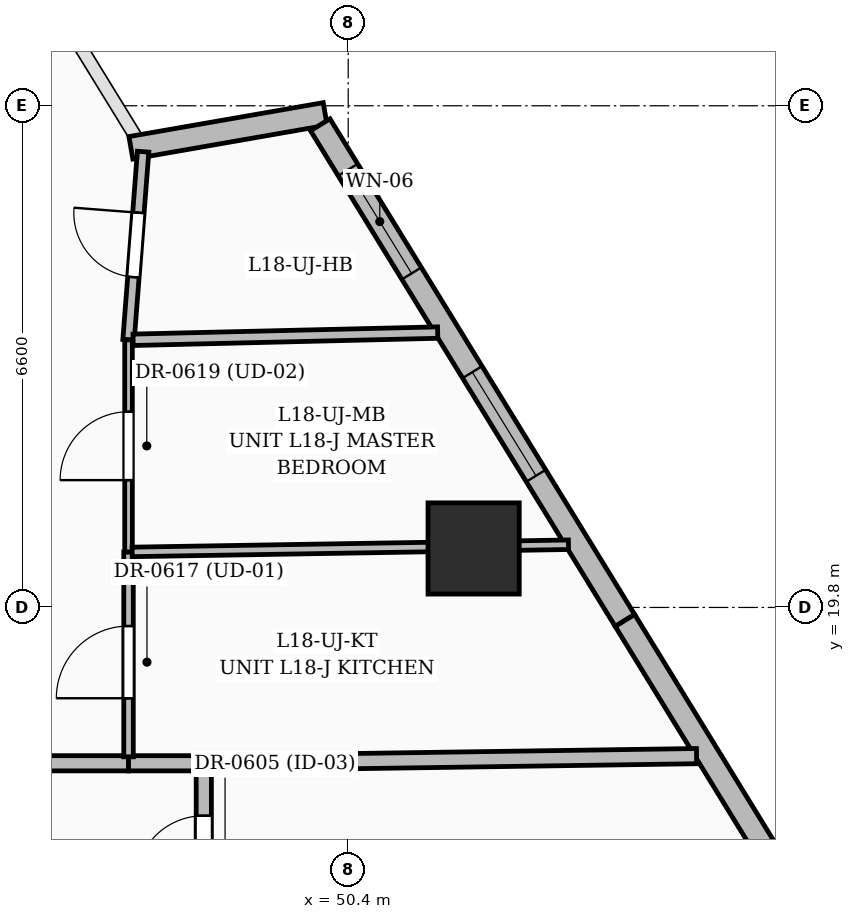
"""IFC4 building model, lengths in metres.
Left out: names, types, materials, properties, quantities, classifications, styles, units other than length and angle.
Written with IfcOpenShell. Run it as: python <this file> out.ifc"""

import sys

from ifc_helpers import new_model, si_unit, direction, frame, frame_2d, origin, origin_2d, place, context, subcontext, project, spatial, rectangle, extrude, element, fill, save


model = new_model("IFC4")
c1 = context("Model", 3, precision=1e-05, world=origin(), true_north=direction((0.0, 1.0)))
c2 = subcontext(c1, "Body", "Model", "MODEL_VIEW")
j1 = project(units=[si_unit("LENGTHUNIT", "METRE"), si_unit("PLANEANGLEUNIT", "RADIAN")], contexts=[c1])
p1 = place(None, origin())
s1 = spatial("IfcSite", under=j1, at=p1, CompositionType="ELEMENT")
p2 = place(p1, origin())
s2 = spatial("IfcBuilding", under=s1, at=p2, CompositionType="ELEMENT")
p3 = place(p2, frame((0.0, 0.0, 75.0)))
s3 = spatial("IfcBuildingStorey", under=s2, at=p3, CompositionType="ELEMENT", Elevation=75.0)
p4 = place(p3, frame((52.05, 20.576, 0.0), z_axis=(0.0, 0.0, 1.0), x_axis=(1.0, 0.0, 0.0)))
e1 = element("IfcColumn", 1, at=p4, inside=s3, PredefinedType="COLUMN", context=c2, shape_type="SweptSolid", body=[
    extrude(rectangle(XDim=1.2, YDim=1.2, at=origin_2d()), origin(), (0.0, 0.0, 1.0), 3.6),
])
p5 = place(p3, frame((47.541, 25.847, 0.0), z_axis=(0.0, 0.0, 1.0), x_axis=(0.985095505459, 0.172008270511, 0.0)))
e2 = element("IfcWall", 2, at=p5, inside=s3, PredefinedType="SOLIDWALL", context=c2, shape_type="SweptSolid", body=[
    extrude(rectangle(XDim=2.594, YDim=0.3, at=frame_2d((1.297, 0.0))), origin(), (0.0, 0.0, 1.0), 2.375),
])
p6 = place(p3, frame((50.032, 26.15, 0.0), z_axis=(0.0, 0.0, 1.0), x_axis=(0.523673810553, -0.851918857721, 0.0)))
e3 = element("IfcWall", 3, at=p6, inside=s3, PredefinedType="SOLIDWALL", context=c2, shape_type="SweptSolid", body=[
    extrude(rectangle(XDim=7.654, YDim=0.3, at=frame_2d((3.827, 0.0))), origin(), (0.0, 0.0, 1.0), 3.35),
])
p7 = place(p6, frame((0.695, 0.0, 0.55)))
e4 = element("IfcOpeningElement", 4, at=p7, cuts=e3, PredefinedType="OPENING", context=c2, shape_type="SweptSolid", body=[
    extrude(rectangle(XDim=1.6, YDim=2.2, at=frame_2d((0.8, 1.1))), frame((0.0, 0.16, 0.0), z_axis=(0.0, -1.0, 0.0), x_axis=(1.0, 0.0, 0.0)), (0.0, 0.0, 1.0), 0.32),
])
p8 = place(p6, frame((3.82, 0.0, 0.55)))
e5 = element("IfcOpeningElement", 5, at=p8, cuts=e3, PredefinedType="OPENING", context=c2, shape_type="SweptSolid", body=[
    extrude(rectangle(XDim=1.6, YDim=2.2, at=frame_2d((0.8, 1.1))), frame((0.0, 0.16, 0.0), z_axis=(0.0, -1.0, 0.0), x_axis=(1.0, 0.0, 0.0)), (0.0, 0.0, 1.0), 0.32),
])
p9 = place(p3, frame((54.041, 19.629, 0.0), z_axis=(0.0, 0.0, 1.0), x_axis=(0.523661280051, -0.851926560083, 0.0)))
e6 = element("IfcWall", 6, at=p9, inside=s3, PredefinedType="SOLIDWALL", context=c2, shape_type="SweptSolid", body=[
    extrude(rectangle(XDim=7.934, YDim=0.3, at=frame_2d((3.967, 0.0))), origin(), (0.0, 0.0, 1.0), 3.35),
])
p10 = place(p9, frame((3.9, 0.0, 0.6)))
e7 = element("IfcOpeningElement", 7, at=p10, cuts=e6, PredefinedType="OPENING", context=c2, shape_type="SweptSolid", body=[
    extrude(rectangle(XDim=1.5, YDim=2.1, at=frame_2d((0.75, 1.05))), frame((0.0, 0.16, 0.0), z_axis=(0.0, -1.0, 0.0), x_axis=(1.0, 0.0, 0.0)), (0.0, 0.0, 1.0), 0.32),
])
p11 = place(p3, frame((48.5, 15.47, 0.0), z_axis=(0.0, 0.0, 1.0), x_axis=(0.0, 1.0, 0.0)))
e8 = element("IfcWall", 8, at=p11, inside=s3, PredefinedType="PARTITIONING", context=c2, shape_type="SweptSolid", body=[
    extrude(rectangle(XDim=2.28, YDim=0.2, at=frame_2d((1.14, 0.0))), origin(), (0.0, 0.0, 1.0), 2.345),
])
p12 = place(p11, frame((0.69, 0.0, 0.0)))
e9 = element("IfcOpeningElement", 9, at=p12, cuts=e8, PredefinedType="OPENING", context=c2, shape_type="SweptSolid", body=[
    extrude(rectangle(XDim=0.9, YDim=2.1, at=frame_2d((0.45, 1.05))), frame((0.0, 0.11, 0.0), z_axis=(0.0, -1.0, 0.0), x_axis=(1.0, 0.0, 0.0)), (0.0, 0.0, 1.0), 0.22),
])
p13 = place(p3, frame((47.51, 17.75, 0.0), z_axis=(0.0, 0.0, 1.0), x_axis=(-1.0, 0.0, 0.0)))
e10 = element("IfcWall", 10, at=p13, inside=s3, PredefinedType="PARTITIONING", context=c2, shape_type="SweptSolid", body=[
    extrude(rectangle(XDim=5.57, YDim=0.2, at=frame_2d((2.785, 0.0))), origin(), (0.0, 0.0, 1.0), 2.309),
])
p14 = place(p13, frame((3.0, 0.0, 0.0)))
e11 = element("IfcOpeningElement", 11, at=p14, cuts=e10, PredefinedType="OPENING", context=c2, shape_type="SweptSolid", body=[
    extrude(rectangle(XDim=1.0, YDim=2.2, at=frame_2d((0.5, 1.1))), frame((0.0, 0.11, 0.0), z_axis=(0.0, -1.0, 0.0), x_axis=(1.0, 0.0, 0.0)), (0.0, 0.0, 1.0), 0.22),
])
p15 = place(p3, frame((48.415, 17.75, 0.0), z_axis=(0.0, 0.0, 1.0), x_axis=(-1.0, 0.0, 0.0)))
e12 = element("IfcWall", 12, at=p15, inside=s3, PredefinedType="PARTITIONING", context=c2, shape_type="SweptSolid", body=[
    extrude(rectangle(XDim=0.905, YDim=0.2, at=frame_2d((0.453, 0.0))), origin(), (0.0, 0.0, 1.0), 2.911),
])
p16 = place(p3, frame((54.983, 17.844, 0.0), z_axis=(0.0, 0.0, 1.0), x_axis=(-0.999894330503, -0.014537118977, 0.0)))
e13 = element("IfcWall", 13, at=p16, inside=s3, PredefinedType="PARTITIONING", context=c2, shape_type="SweptSolid", body=[
    extrude(rectangle(XDim=6.399, YDim=0.2, at=frame_2d((3.199, 0.0))), origin(), (0.0, 0.0, 1.0), 2.345),
])
p17 = place(p3, frame((47.51, 23.32, 0.0), z_axis=(0.0, 0.0, 1.0), x_axis=(0.077275386284, 0.997009786649, 0.0)))
e14 = element("IfcWall", 14, at=p17, inside=s3, PredefinedType="PARTITIONING", context=c2, shape_type="SweptSolid", body=[
    extrude(rectangle(XDim=2.483, YDim=0.15, at=frame_2d((1.242, 0.0))), origin(), (0.0, 0.0, 1.0), 3.35),
])
p18 = place(p17, frame((0.828, 0.0, 0.0)))
e15 = element("IfcOpeningElement", 15, at=p18, cuts=e14, PredefinedType="OPENING", context=c2, shape_type="SweptSolid", body=[
    extrude(rectangle(XDim=0.85, YDim=2.1, at=frame_2d((0.425, 1.05))), frame((0.0, 0.085, 0.0), z_axis=(0.0, -1.0, 0.0), x_axis=(1.0, 0.0, 0.0)), (0.0, 0.0, 1.0), 0.17),
])
p19 = place(p3, frame((47.51, 17.835, 0.0), z_axis=(0.0, 0.0, 1.0), x_axis=(0.0, 1.0, 0.0)))
e16 = element("IfcWall", 16, at=p19, inside=s3, PredefinedType="PARTITIONING", context=c2, shape_type="SweptSolid", body=[
    extrude(rectangle(XDim=2.695, YDim=0.125, at=frame_2d((1.348, 0.0))), origin(), (0.0, 0.0, 1.0), 2.911),
])
p20 = place(p19, frame((0.771, 0.0, 0.0)))
e17 = element("IfcOpeningElement", 17, at=p20, cuts=e16, PredefinedType="OPENING", context=c2, shape_type="SweptSolid", body=[
    extrude(rectangle(XDim=0.95, YDim=2.2, at=frame_2d((0.475, 1.1))), frame((0.0, 0.072, 0.0), z_axis=(0.0, -1.0, 0.0), x_axis=(1.0, 0.0, 0.0)), (0.0, 0.0, 1.0), 0.145),
])
p21 = place(p3, frame((47.51, 20.53, 0.0), z_axis=(0.0, 0.0, 1.0), x_axis=(0.0, 1.0, 0.0)))
e18 = element("IfcWall", 18, at=p21, inside=s3, PredefinedType="PARTITIONING", context=c2, shape_type="SweptSolid", body=[
    extrude(rectangle(XDim=2.79, YDim=0.1, at=frame_2d((1.395, 0.0))), origin(), (0.0, 0.0, 1.0), 2.911),
])
p22 = place(p21, frame((0.945, 0.0, 0.0)))
e19 = element("IfcOpeningElement", 19, at=p22, cuts=e18, PredefinedType="OPENING", context=c2, shape_type="SweptSolid", body=[
    extrude(rectangle(XDim=0.9, YDim=2.15, at=frame_2d((0.45, 1.075))), frame((0.0, 0.06, 0.0), z_axis=(0.0, -1.0, 0.0), x_axis=(1.0, 0.0, 0.0)), (0.0, 0.0, 1.0), 0.12),
])
p23 = place(p3, frame((47.57, 23.321, 0.0), z_axis=(0.0, 0.0, 1.0), x_axis=(0.999720663017, 0.023634634246, 0.0)))
e20 = element("IfcWall", 20, at=p23, inside=s3, PredefinedType="PARTITIONING", context=c2, shape_type="SweptSolid", body=[
    extrude(rectangle(XDim=4.008, YDim=0.15, at=frame_2d((2.004, 0.0))), origin(), (0.0, 0.0, 1.0), 2.37),
])
p24 = place(p3, frame((53.298, 20.625, 0.0), z_axis=(0.0, 0.0, 1.0), x_axis=(-0.9998645785, -0.016456751239, 0.0)))
e21 = element("IfcWall", 21, at=p24, inside=s3, PredefinedType="PARTITIONING", context=c2, shape_type="SweptSolid", body=[
    extrude(rectangle(XDim=5.741, YDim=0.125, at=frame_2d((2.871, 0.0))), origin(), (0.0, 0.0, 1.0), 2.911),
])
p25 = place(p7, origin())
e22 = element("IfcWindow", 22, at=p25, inside=s3, PartitioningType="SINGLE_PANEL", PredefinedType="WINDOW", context=c2, shape_type="SweptSolid", body=[
    extrude(rectangle(XDim=1.6, YDim=2.2, at=frame_2d((0.8, 1.1))), frame((0.0, 0.03, 0.0), z_axis=(0.0, -1.0, 0.0), x_axis=(1.0, 0.0, 0.0)), (0.0, 0.0, 1.0), 0.06),
])
fill(e4, e22)
p26 = place(p8, origin())
e23 = element("IfcWindow", 23, at=p26, inside=s3, PartitioningType="SINGLE_PANEL", PredefinedType="WINDOW", context=c2, shape_type="SweptSolid", body=[
    extrude(rectangle(XDim=1.6, YDim=2.2, at=frame_2d((0.8, 1.1))), frame((0.0, 0.03, 0.0), z_axis=(0.0, -1.0, 0.0), x_axis=(1.0, 0.0, 0.0)), (0.0, 0.0, 1.0), 0.06),
])
fill(e5, e23)
p27 = place(p12, origin())
e24 = element("IfcDoor", 24, at=p27, inside=s3, OperationType="SINGLE_SWING_LEFT", PredefinedType="DOOR", context=c2, shape_type="SweptSolid", body=[
    extrude(rectangle(XDim=0.9, YDim=2.1, at=frame_2d((0.45, 1.05))), frame((0.0, 0.025, 0.0), z_axis=(0.0, -1.0, 0.0), x_axis=(1.0, 0.0, 0.0)), (0.0, 0.0, 1.0), 0.05),
])
fill(e9, e24)
p28 = place(p20, origin())
e25 = element("IfcDoor", 25, at=p28, inside=s3, OperationType="SINGLE_SWING_LEFT", PredefinedType="DOOR", context=c2, shape_type="SweptSolid", body=[
    extrude(rectangle(XDim=0.95, YDim=2.2, at=frame_2d((0.475, 1.1))), frame((0.0, 0.025, 0.0), z_axis=(0.0, -1.0, 0.0), x_axis=(1.0, 0.0, 0.0)), (0.0, 0.0, 1.0), 0.05),
])
fill(e17, e25)
p29 = place(p18, origin())
e26 = element("IfcDoor", 26, at=p29, inside=s3, OperationType="SINGLE_SWING_RIGHT", PredefinedType="DOOR", context=c2, shape_type="SweptSolid", body=[
    extrude(rectangle(XDim=0.85, YDim=2.1, at=frame_2d((0.425, 1.05))), frame((0.0, 0.025, 0.0), z_axis=(0.0, -1.0, 0.0), x_axis=(1.0, 0.0, 0.0)), (0.0, 0.0, 1.0), 0.05),
])
fill(e15, e26)
p30 = place(p22, origin())
e27 = element("IfcDoor", 27, at=p30, inside=s3, OperationType="SINGLE_SWING_LEFT", PredefinedType="DOOR", context=c2, shape_type="SweptSolid", body=[
    extrude(rectangle(XDim=0.9, YDim=2.15, at=frame_2d((0.45, 1.075))), frame((0.0, 0.025, 0.0), z_axis=(0.0, -1.0, 0.0), x_axis=(1.0, 0.0, 0.0)), (0.0, 0.0, 1.0), 0.05),
])
fill(e19, e27)
save(model, sys.argv[1])
